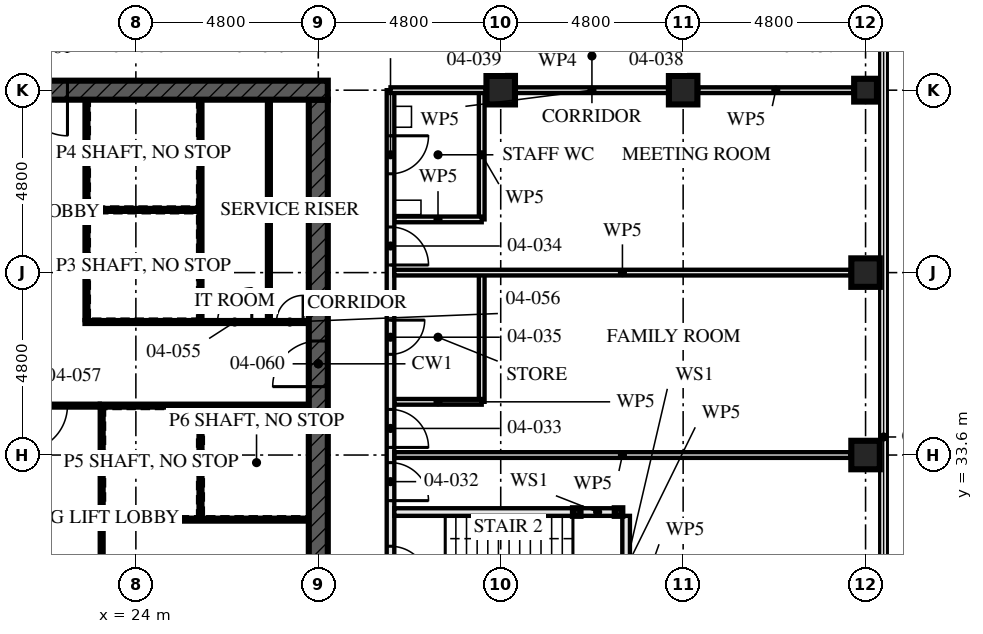
"""IFC4 building model, lengths in metres.
Left out: names, types, materials, properties, quantities, classifications, styles, units other than length and angle.
Written with IfcOpenShell. Run it as: python <this file> out.ifc"""

import sys

from ifc_helpers import new_model, si_unit, direction, frame, frame_2d, origin, origin_2d, place, context, subcontext, project, spatial, rectangle, hollow_rectangle, extrude, element, fill, save


model = new_model("IFC4")
c1 = context("Model", 3, precision=1e-05, world=origin(), true_north=direction((0.0, 1.0)))
c2 = subcontext(c1, "Body", "Model", "MODEL_VIEW")
j1 = project(units=[si_unit("LENGTHUNIT", "METRE"), si_unit("PLANEANGLEUNIT", "RADIAN")], contexts=[c1])
p1 = place(None, origin())
s1 = spatial("IfcSite", under=j1, at=p1, CompositionType="ELEMENT")
p2 = place(p1, origin())
s2 = spatial("IfcBuilding", under=s1, at=p2, CompositionType="ELEMENT")
p3 = place(p2, frame((0.0, 0.0, 18.0)))
s3 = spatial("IfcBuildingStorey", under=s2, at=p3, CompositionType="ELEMENT", Elevation=18.0)
for number, where, z_axis, x_axis in (
    (1, (33.6, 43.2, 0.0), (0.0, 0.0, 1.0), (0.0, 1.0, 0.0)),
    (2, (38.4, 43.2, 0.0), (0.0, 0.0, 1.0), (0.0, 1.0, 0.0)),
    (3, (43.2, 33.6, 0.0), (0.0, 0.0, 1.0), (1.0, 0.0, 0.0)),
    (4, (43.2, 38.4, 0.0), (0.0, 0.0, 1.0), (1.0, 0.0, 0.0)),
):
    element("IfcColumn", number, at=place(p3, frame(where, z_axis=z_axis, x_axis=x_axis)), inside=s3, PredefinedType="COLUMN", context=c2, shape_type="SweptSolid", body=[
        extrude(hollow_rectangle(XDim=0.75, YDim=0.75, WallThickness=0.08, at=origin_2d()), origin(), (0.0, 0.0, 1.0), 4.5),
    ])
p4 = place(p3, frame((43.2, 43.2, 0.0), z_axis=(0.0, 0.0, 1.0), x_axis=(0.0, 1.0, 0.0)))
e5 = element("IfcColumn", 5, at=p4, inside=s3, PredefinedType="COLUMN", context=c2, shape_type="SweptSolid", body=[
    extrude(hollow_rectangle(XDim=0.6, YDim=0.6, WallThickness=0.08, at=origin_2d()), origin(), (0.0, 0.0, 1.0), 4.5),
])
p5 = place(p3, frame((29.05, 43.2, -0.17), z_axis=(0.0, 0.0, 1.0), x_axis=(-1.0, 0.0, 0.0)))
e6 = element("IfcWall", 6, at=p5, inside=s3, PredefinedType="SHEAR", context=c2, shape_type="SweptSolid", body=[
    extrude(rectangle(XDim=14.9, YDim=0.5, at=frame_2d((7.45, 0.0))), origin(), (0.0, 0.0, 1.0), 4.5),
])
p6 = place(p5, frame((6.85, 0.0, 0.17)))
e7 = element("IfcOpeningElement", 7, at=p6, cuts=e6, PredefinedType="OPENING", context=c2, shape_type="SweptSolid", body=[
    extrude(rectangle(XDim=1.2, YDim=2.1, at=frame_2d((0.6, 1.05))), frame((0.0, 0.26, 0.0), z_axis=(0.0, -1.0, 0.0), x_axis=(1.0, 0.0, 0.0)), (0.0, 0.0, 1.0), 0.521),
])
p7 = place(p3, frame((28.8, 29.05, -0.17), z_axis=(0.0, 0.0, 1.0), x_axis=(0.0, 1.0, 0.0)))
e8 = element("IfcWall", 8, at=p7, inside=s3, PredefinedType="SHEAR", context=c2, shape_type="SweptSolid", body=[
    extrude(rectangle(XDim=13.9, YDim=0.5, at=frame_2d((6.95, 0.0))), origin(), (0.0, 0.0, 1.0), 4.5),
])
p8 = place(p7, frame((6.35, 0.0, 0.17)))
e9 = element("IfcOpeningElement", 9, at=p8, cuts=e8, PredefinedType="OPENING", context=c2, shape_type="SweptSolid", body=[
    extrude(rectangle(XDim=1.2, YDim=2.1, at=frame_2d((0.6, 1.05))), frame((0.0, 0.26, 0.0), z_axis=(0.0, -1.0, 0.0), x_axis=(1.0, 0.0, 0.0)), (0.0, 0.0, 1.0), 0.521),
])
for number, where, z_axis, x_axis in (
    (10, (36.7, 32.1, 0.0), (0.0, 0.0, 1.0), (1.0, 0.0, 0.0)),
    (11, (35.6, 32.1, 0.0), (0.0, 0.0, 1.0), (1.0, 0.0, 0.0)),
):
    element("IfcColumn", number, at=place(p3, frame(where, z_axis=z_axis, x_axis=x_axis)), inside=s3, PredefinedType="COLUMN", context=c2, shape_type="SweptSolid", body=[
        extrude(hollow_rectangle(XDim=0.2, YDim=0.2, WallThickness=0.008, at=origin_2d()), origin(), (0.0, 0.0, 1.0), 4.33),
    ])
p9 = place(p3, frame((36.6, 32.1, 0.0), z_axis=(0.0, 0.0, 1.0), x_axis=(-1.0, 0.0, 0.0)))
e12 = element("IfcWall", 12, at=p9, inside=s3, PredefinedType="SOLIDWALL", context=c2, shape_type="SweptSolid", body=[
    extrude(rectangle(XDim=0.9, YDim=0.2, at=frame_2d((0.45, 0.0))), origin(), (0.0, 0.0, 1.0), 3.99),
])
p10 = place(p3, frame((35.5, 32.1, 0.0), z_axis=(0.0, 0.0, 1.0), x_axis=(-1.0, 0.0, 0.0)))
e13 = element("IfcWall", 13, at=p10, inside=s3, PredefinedType="SOLIDWALL", context=c2, shape_type="SweptSolid", body=[
    extrude(rectangle(XDim=4.7, YDim=0.2, at=frame_2d((2.35, 0.0))), origin(), (0.0, 0.0, 1.0), 3.99),
])
p11 = place(p3, frame((36.9, 29.4, 0.0), z_axis=(0.0, 0.0, 1.0), x_axis=(0.0, 1.0, 0.0)))
e14 = element("IfcWall", 14, at=p11, inside=s3, PredefinedType="SOLIDWALL", context=c2, shape_type="SweptSolid", body=[
    extrude(rectangle(XDim=2.6, YDim=0.2, at=frame_2d((1.3, 0.0))), origin(), (0.0, 0.0, 1.0), 4.33),
])
p12 = place(p3, frame((33.1, 35.0, 0.0), z_axis=(0.0, 0.0, 1.0), x_axis=(-1.0, 0.0, 0.0)))
e15 = element("IfcWall", 15, at=p12, inside=s3, PredefinedType="PARTITIONING", context=c2, shape_type="SweptSolid", body=[
    extrude(rectangle(XDim=2.3, YDim=0.15, at=frame_2d((1.15, 0.0))), origin(), (0.0, 0.0, 1.0), 4.33),
])
p13 = place(p3, frame((33.1, 35.0, 0.0), z_axis=(0.0, 0.0, 1.0), x_axis=(0.0, 1.0, 0.0)))
e16 = element("IfcWall", 16, at=p13, inside=s3, PredefinedType="PARTITIONING", context=c2, shape_type="SweptSolid", body=[
    extrude(rectangle(XDim=3.4, YDim=0.15, at=frame_2d((1.7, 0.0))), origin(), (0.0, 0.0, 1.0), 4.33),
])
p14 = place(p3, frame((33.1, 39.8, 0.0), z_axis=(0.0, 0.0, 1.0), x_axis=(-1.0, 0.0, 0.0)))
e17 = element("IfcWall", 17, at=p14, inside=s3, PredefinedType="PARTITIONING", context=c2, shape_type="SweptSolid", body=[
    extrude(rectangle(XDim=2.3, YDim=0.15, at=frame_2d((1.15, 0.0))), origin(), (0.0, 0.0, 1.0), 4.33),
])
p15 = place(p3, frame((33.1, 39.8, 0.0), z_axis=(0.0, 0.0, 1.0), x_axis=(0.0, 1.0, 0.0)))
e18 = element("IfcWall", 18, at=p15, inside=s3, PredefinedType="PARTITIONING", context=c2, shape_type="SweptSolid", body=[
    extrude(rectangle(XDim=3.4, YDim=0.15, at=frame_2d((1.7, 0.0))), origin(), (0.0, 0.0, 1.0), 4.33),
])
for number, where, z_axis, x_axis in (
    (19, (42.805, 33.6, 0.0), (0.0, 0.0, 1.0), (-1.0, 0.0, 0.0)),
    (20, (42.805, 38.4, 0.0), (0.0, 0.0, 1.0), (-1.0, 0.0, 0.0)),
):
    element("IfcWall", number, at=place(p3, frame(where, z_axis=z_axis, x_axis=x_axis)), inside=s3, PredefinedType="PARTITIONING", context=c2, shape_type="SweptSolid", body=[
        extrude(rectangle(XDim=12.005, YDim=0.15, at=frame_2d((6.002, 0.0))), origin(), (0.0, 0.0, 1.0), 3.55),
    ])
p16 = place(p3, frame((30.7, 28.8, 0.0), z_axis=(0.0, 0.0, 1.0), x_axis=(0.0, 1.0, 0.0)))
e21 = element("IfcWall", 21, at=p16, inside=s3, PredefinedType="PARTITIONING", context=c2, shape_type="SweptSolid", body=[
    extrude(rectangle(XDim=14.4, YDim=0.2, at=frame_2d((7.2, 0.0))), origin(), (0.0, 0.0, 1.0), 3.55),
])
p17 = place(p16, frame((1.4, 0.0, 0.0)))
e22 = element("IfcOpeningElement", 22, at=p17, cuts=e21, PredefinedType="OPENING", context=c2, shape_type="SweptSolid", body=[
    extrude(rectangle(XDim=1.0, YDim=2.1, at=frame_2d((0.5, 1.05))), frame((0.0, 0.111, 0.0), z_axis=(0.0, -1.0, 0.0), x_axis=(1.0, 0.0, 0.0)), (0.0, 0.0, 1.0), 0.221),
])
p18 = place(p16, frame((3.6, 0.0, 0.0)))
e23 = element("IfcOpeningElement", 23, at=p18, cuts=e21, PredefinedType="OPENING", context=c2, shape_type="SweptSolid", body=[
    extrude(rectangle(XDim=1.0, YDim=2.4, at=frame_2d((0.5, 1.2))), frame((0.0, 0.111, 0.0), z_axis=(0.0, -1.0, 0.0), x_axis=(1.0, 0.0, 0.0)), (0.0, 0.0, 1.0), 0.221),
])
p19 = place(p16, frame((5.0, 0.0, 0.0)))
e24 = element("IfcOpeningElement", 24, at=p19, cuts=e21, PredefinedType="OPENING", context=c2, shape_type="SweptSolid", body=[
    extrude(rectangle(XDim=1.0, YDim=2.4, at=frame_2d((0.5, 1.2))), frame((0.0, 0.111, 0.0), z_axis=(0.0, -1.0, 0.0), x_axis=(1.0, 0.0, 0.0)), (0.0, 0.0, 1.0), 0.221),
])
p20 = place(p16, frame((9.8, 0.0, 0.0)))
e25 = element("IfcOpeningElement", 25, at=p20, cuts=e21, PredefinedType="OPENING", context=c2, shape_type="SweptSolid", body=[
    extrude(rectangle(XDim=1.0, YDim=2.4, at=frame_2d((0.5, 1.2))), frame((0.0, 0.111, 0.0), z_axis=(0.0, -1.0, 0.0), x_axis=(1.0, 0.0, 0.0)), (0.0, 0.0, 1.0), 0.221),
])
p21 = place(p16, frame((7.45, 0.0, 0.0)))
e26 = element("IfcOpeningElement", 26, at=p21, cuts=e21, PredefinedType="OPENING", context=c2, shape_type="SweptSolid", body=[
    extrude(rectangle(XDim=0.9, YDim=2.1, at=frame_2d((0.45, 1.05))), frame((0.0, 0.111, 0.0), z_axis=(0.0, -1.0, 0.0), x_axis=(1.0, 0.0, 0.0)), (0.0, 0.0, 1.0), 0.221),
])
p22 = place(p16, frame((12.2, 0.0, 0.0)))
e27 = element("IfcOpeningElement", 27, at=p22, cuts=e21, PredefinedType="OPENING", context=c2, shape_type="SweptSolid", body=[
    extrude(rectangle(XDim=1.0, YDim=2.1, at=frame_2d((0.5, 1.05))), frame((0.0, 0.111, 0.0), z_axis=(0.0, -1.0, 0.0), x_axis=(1.0, 0.0, 0.0)), (0.0, 0.0, 1.0), 0.221),
])
for number, where, z_axis, x_axis in (
    (28, (27.5, 37.15, 0.0), (0.0, 0.0, 1.0), (0.0, 1.0, 0.0)),
    (29, (22.7, 37.15, 0.0), (0.0, 0.0, 1.0), (0.0, 1.0, 0.0)),
):
    element("IfcWall", number, at=place(p3, frame(where, z_axis=z_axis, x_axis=x_axis)), inside=s3, PredefinedType="SOLIDWALL", context=c2, shape_type="SweptSolid", body=[
        extrude(rectangle(XDim=5.8, YDim=0.1, at=frame_2d((2.9, 0.0))), origin(), (0.0, 0.0, 1.0), 4.33),
    ])
p23 = place(p3, frame((23.1, 29.05, 0.0), z_axis=(0.0, 0.0, 1.0), x_axis=(0.0, 1.0, 0.0)))
e30 = element("IfcWall", 30, at=p23, inside=s3, PredefinedType="SOLIDWALL", context=c2, shape_type="SweptSolid", body=[
    extrude(rectangle(XDim=5.8, YDim=0.1, at=frame_2d((2.9, 0.0))), origin(), (0.0, 0.0, 1.0), 4.33),
])
p24 = place(p23, frame((1.0, 0.0, 0.0)))
e31 = element("IfcOpeningElement", 31, at=p24, cuts=e30, PredefinedType="OPENING", context=c2, shape_type="SweptSolid", body=[
    extrude(rectangle(XDim=0.7, YDim=2.1, at=frame_2d((0.35, 1.05))), frame((0.0, 0.061, 0.0), z_axis=(0.0, -1.0, 0.0), x_axis=(1.0, 0.0, 0.0)), (0.0, 0.0, 1.0), 0.121),
])
p25 = place(p3, frame((23.05, 34.9, 0.0), z_axis=(0.0, 0.0, 1.0), x_axis=(1.0, 0.0, 0.0)))
e32 = element("IfcWall", 32, at=p25, inside=s3, PredefinedType="SOLIDWALL", context=c2, shape_type="SweptSolid", body=[
    extrude(rectangle(XDim=5.5, YDim=0.1, at=frame_2d((2.75, 0.0))), origin(), (0.0, 0.0, 1.0), 4.33),
])
p26 = place(p3, frame((22.65, 37.1, 0.0), z_axis=(0.0, 0.0, 1.0), x_axis=(1.0, 0.0, 0.0)))
e33 = element("IfcWall", 33, at=p26, inside=s3, PredefinedType="SOLIDWALL", context=c2, shape_type="SweptSolid", body=[
    extrude(rectangle(XDim=5.9, YDim=0.1, at=frame_2d((2.95, 0.0))), origin(), (0.0, 0.0, 1.0), 4.33),
])
p27 = place(p26, frame((3.5, 0.0, 0.0)))
e34 = element("IfcOpeningElement", 34, at=p27, cuts=e33, PredefinedType="OPENING", context=c2, shape_type="SweptSolid", body=[
    extrude(rectangle(XDim=0.9, YDim=2.1, at=frame_2d((0.45, 1.05))), frame((0.0, 0.061, 0.0), z_axis=(0.0, -1.0, 0.0), x_axis=(1.0, 0.0, 0.0)), (0.0, 0.0, 1.0), 0.121),
])
p28 = place(p26, frame((5.05, 0.0, 0.0)))
e35 = element("IfcOpeningElement", 35, at=p28, cuts=e33, PredefinedType="OPENING", context=c2, shape_type="SweptSolid", body=[
    extrude(rectangle(XDim=0.7, YDim=2.1, at=frame_2d((0.35, 1.05))), frame((0.0, 0.061, 0.0), z_axis=(0.0, -1.0, 0.0), x_axis=(1.0, 0.0, 0.0)), (0.0, 0.0, 1.0), 0.121),
])
p29 = place(p3, frame((20.55, 34.9, 0.0), z_axis=(0.0, 0.0, 1.0), x_axis=(1.0, 0.0, 0.0)))
e36 = element("IfcWall", 36, at=p29, inside=s3, PredefinedType="SOLIDWALL", context=c2, shape_type="SweptSolid", body=[
    extrude(rectangle(XDim=2.5, YDim=0.1, at=frame_2d((1.25, 0.0))), origin(), (0.0, 0.0, 1.0), 4.33),
])
p30 = place(p29, frame((0.45, 0.0, 0.0)))
e37 = element("IfcOpeningElement", 37, at=p30, cuts=e36, PredefinedType="OPENING", context=c2, shape_type="SweptSolid", body=[
    extrude(rectangle(XDim=1.2, YDim=2.1, at=frame_2d((0.6, 1.05))), frame((0.0, 0.061, 0.0), z_axis=(0.0, -1.0, 0.0), x_axis=(1.0, 0.0, 0.0)), (0.0, 0.0, 1.0), 0.121),
])
p31 = place(p3, frame((22.75, 40.05, 0.0), z_axis=(0.0, 0.0, 1.0), x_axis=(1.0, 0.0, 0.0)))
e38 = element("IfcWall", 38, at=p31, inside=s3, PredefinedType="SOLIDWALL", context=c2, shape_type="SweptSolid", body=[
    extrude(rectangle(XDim=2.9, YDim=0.1, at=frame_2d((1.45, 0.0))), origin(), (0.0, 0.0, 1.0), 4.33),
])
p32 = place(p3, frame((25.7, 37.15, 0.0), z_axis=(0.0, 0.0, 1.0), x_axis=(0.0, 1.0, 0.0)))
e39 = element("IfcWall", 39, at=p32, inside=s3, PredefinedType="SOLIDWALL", context=c2, shape_type="SweptSolid", body=[
    extrude(rectangle(XDim=5.8, YDim=0.1, at=frame_2d((2.9, 0.0))), origin(), (0.0, 0.0, 1.0), 4.33),
])
p33 = place(p3, frame((25.7, 31.95, 0.0), z_axis=(0.0, 0.0, 1.0), x_axis=(0.0, 1.0, 0.0)))
e40 = element("IfcWall", 40, at=p33, inside=s3, PredefinedType="SOLIDWALL", context=c2, shape_type="SweptSolid", body=[
    extrude(rectangle(XDim=2.9, YDim=0.1, at=frame_2d((1.45, 0.0))), origin(), (0.0, 0.0, 1.0), 4.33),
])
p34 = place(p3, frame((23.15, 31.9, 0.0), z_axis=(0.0, 0.0, 1.0), x_axis=(1.0, 0.0, 0.0)))
e41 = element("IfcWall", 41, at=p34, inside=s3, PredefinedType="SOLIDWALL", context=c2, shape_type="SweptSolid", body=[
    extrude(rectangle(XDim=5.4, YDim=0.1, at=frame_2d((2.7, 0.0))), origin(), (0.0, 0.0, 1.0), 4.33),
])
p35 = place(p3, frame((42.88, 43.2, 0.0), z_axis=(0.0, 0.0, 1.0), x_axis=(-1.0, 0.0, 0.0)))
e42 = element("IfcWall", 42, at=p35, inside=s3, PredefinedType="PARTITIONING", context=c2, shape_type="SweptSolid", body=[
    extrude(rectangle(XDim=4.085, YDim=0.15, at=frame_2d((2.042, 0.0))), origin(), (0.0, 0.0, 1.0), 3.32),
])
p36 = place(p3, frame((38.005, 43.2, 0.0), z_axis=(0.0, 0.0, 1.0), x_axis=(-1.0, 0.0, 0.0)))
e43 = element("IfcWall", 43, at=p36, inside=s3, PredefinedType="PARTITIONING", context=c2, shape_type="SweptSolid", body=[
    extrude(rectangle(XDim=4.01, YDim=0.15, at=frame_2d((2.005, 0.0))), origin(), (0.0, 0.0, 1.0), 3.32),
])
p37 = place(p3, frame((33.205, 43.2, 0.0), z_axis=(0.0, 0.0, 1.0), x_axis=(-1.0, 0.0, 0.0)))
e44 = element("IfcWall", 44, at=p37, inside=s3, PredefinedType="PARTITIONING", context=c2, shape_type="SweptSolid", body=[
    extrude(rectangle(XDim=2.505, YDim=0.15, at=frame_2d((1.252, 0.0))), origin(), (0.0, 0.0, 1.0), 3.32),
])
p38 = place(p17, frame((1.0, 0.0, 0.0), z_axis=(0.0, 0.0, 1.0), x_axis=(-1.0, 0.0, 0.0)))
e45 = element("IfcDoor", 45, at=p38, inside=s3, OperationType="SINGLE_SWING_LEFT", PredefinedType="DOOR", context=c2, shape_type="SweptSolid", body=[
    extrude(rectangle(XDim=1.0, YDim=2.1, at=frame_2d((0.5, 1.05))), frame((0.0, 0.032, 0.0), z_axis=(0.0, -1.0, 0.0), x_axis=(1.0, 0.0, 0.0)), (0.0, 0.0, 1.0), 0.064),
])
fill(e22, e45)
p39 = place(p18, frame((1.0, 0.0, 0.0), z_axis=(0.0, 0.0, 1.0), x_axis=(-1.0, 0.0, 0.0)))
e46 = element("IfcDoor", 46, at=p39, inside=s3, OperationType="SINGLE_SWING_LEFT", PredefinedType="DOOR", context=c2, shape_type="SweptSolid", body=[
    extrude(rectangle(XDim=1.0, YDim=2.4, at=frame_2d((0.5, 1.2))), frame((0.0, 0.027, 0.0), z_axis=(0.0, -1.0, 0.0), x_axis=(1.0, 0.0, 0.0)), (0.0, 0.0, 1.0), 0.054),
])
fill(e23, e46)
p40 = place(p19, frame((1.0, 0.0, 0.0), z_axis=(0.0, 0.0, 1.0), x_axis=(-1.0, 0.0, 0.0)))
e47 = element("IfcDoor", 47, at=p40, inside=s3, OperationType="SINGLE_SWING_LEFT", PredefinedType="DOOR", context=c2, shape_type="SweptSolid", body=[
    extrude(rectangle(XDim=1.0, YDim=2.4, at=frame_2d((0.5, 1.2))), frame((0.0, 0.027, 0.0), z_axis=(0.0, -1.0, 0.0), x_axis=(1.0, 0.0, 0.0)), (0.0, 0.0, 1.0), 0.054),
])
fill(e24, e47)
p41 = place(p20, frame((1.0, 0.0, 0.0), z_axis=(0.0, 0.0, 1.0), x_axis=(-1.0, 0.0, 0.0)))
e48 = element("IfcDoor", 48, at=p41, inside=s3, OperationType="SINGLE_SWING_LEFT", PredefinedType="DOOR", context=c2, shape_type="SweptSolid", body=[
    extrude(rectangle(XDim=1.0, YDim=2.4, at=frame_2d((0.5, 1.2))), frame((0.0, 0.027, 0.0), z_axis=(0.0, -1.0, 0.0), x_axis=(1.0, 0.0, 0.0)), (0.0, 0.0, 1.0), 0.054),
])
fill(e25, e48)
p42 = place(p21, frame((0.9, 0.0, 0.0), z_axis=(0.0, 0.0, 1.0), x_axis=(-1.0, 0.0, 0.0)))
e49 = element("IfcDoor", 49, at=p42, inside=s3, OperationType="SINGLE_SWING_RIGHT", PredefinedType="DOOR", context=c2, shape_type="SweptSolid", body=[
    extrude(rectangle(XDim=0.9, YDim=2.1, at=frame_2d((0.45, 1.05))), frame((0.0, 0.027, 0.0), z_axis=(0.0, -1.0, 0.0), x_axis=(1.0, 0.0, 0.0)), (0.0, 0.0, 1.0), 0.054),
])
fill(e26, e49)
p43 = place(p22, frame((1.0, 0.0, 0.0), z_axis=(0.0, 0.0, 1.0), x_axis=(-1.0, 0.0, 0.0)))
e50 = element("IfcDoor", 50, at=p43, inside=s3, OperationType="SINGLE_SWING_RIGHT", PredefinedType="DOOR", context=c2, shape_type="SweptSolid", body=[
    extrude(rectangle(XDim=1.0, YDim=2.1, at=frame_2d((0.5, 1.05))), frame((0.0, 0.027, 0.0), z_axis=(0.0, -1.0, 0.0), x_axis=(1.0, 0.0, 0.0)), (0.0, 0.0, 1.0), 0.054),
])
fill(e27, e50)
p44 = place(p27, origin())
e51 = element("IfcDoor", 51, at=p44, inside=s3, OperationType="SINGLE_SWING_LEFT", PredefinedType="DOOR", context=c2, shape_type="SweptSolid", body=[
    extrude(rectangle(XDim=0.9, YDim=2.1, at=frame_2d((0.45, 1.05))), frame((0.0, 0.027, 0.0), z_axis=(0.0, -1.0, 0.0), x_axis=(1.0, 0.0, 0.0)), (0.0, 0.0, 1.0), 0.054),
])
fill(e34, e51)
p45 = place(p28, origin())
e52 = element("IfcDoor", 52, at=p45, inside=s3, OperationType="SINGLE_SWING_LEFT", PredefinedType="DOOR", context=c2, shape_type="SweptSolid", body=[
    extrude(rectangle(XDim=0.7, YDim=2.1, at=frame_2d((0.35, 1.05))), frame((0.0, 0.027, 0.0), z_axis=(0.0, -1.0, 0.0), x_axis=(1.0, 0.0, 0.0)), (0.0, 0.0, 1.0), 0.054),
])
fill(e35, e52)
p46 = place(p30, frame((1.2, 0.0, 0.0), z_axis=(0.0, 0.0, 1.0), x_axis=(-1.0, 0.0, 0.0)))
e53 = element("IfcDoor", 53, at=p46, inside=s3, OperationType="SINGLE_SWING_LEFT", PredefinedType="DOOR", context=c2, shape_type="SweptSolid", body=[
    extrude(rectangle(XDim=1.2, YDim=2.1, at=frame_2d((0.6, 1.05))), frame((0.0, 0.027, 0.0), z_axis=(0.0, -1.0, 0.0), x_axis=(1.0, 0.0, 0.0)), (0.0, 0.0, 1.0), 0.054),
])
fill(e37, e53)
p47 = place(p8, origin())
e54 = element("IfcDoor", 54, at=p47, inside=s3, OperationType="SINGLE_SWING_LEFT", PredefinedType="DOOR", context=c2, shape_type="SweptSolid", body=[
    extrude(rectangle(XDim=1.2, YDim=2.1, at=frame_2d((0.6, 1.05))), frame((0.0, 0.027, 0.0), z_axis=(0.0, -1.0, 0.0), x_axis=(1.0, 0.0, 0.0)), (0.0, 0.0, 1.0), 0.054),
])
fill(e9, e54)
p48 = place(p6, origin())
e55 = element("IfcDoor", 55, at=p48, inside=s3, OperationType="SINGLE_SWING_LEFT", PredefinedType="DOOR", context=c2, shape_type="SweptSolid", body=[
    extrude(rectangle(XDim=1.2, YDim=2.1, at=frame_2d((0.6, 1.05))), frame((0.0, 0.027, 0.0), z_axis=(0.0, -1.0, 0.0), x_axis=(1.0, 0.0, 0.0)), (0.0, 0.0, 1.0), 0.054),
])
fill(e7, e55)
save(model, sys.argv[1])
